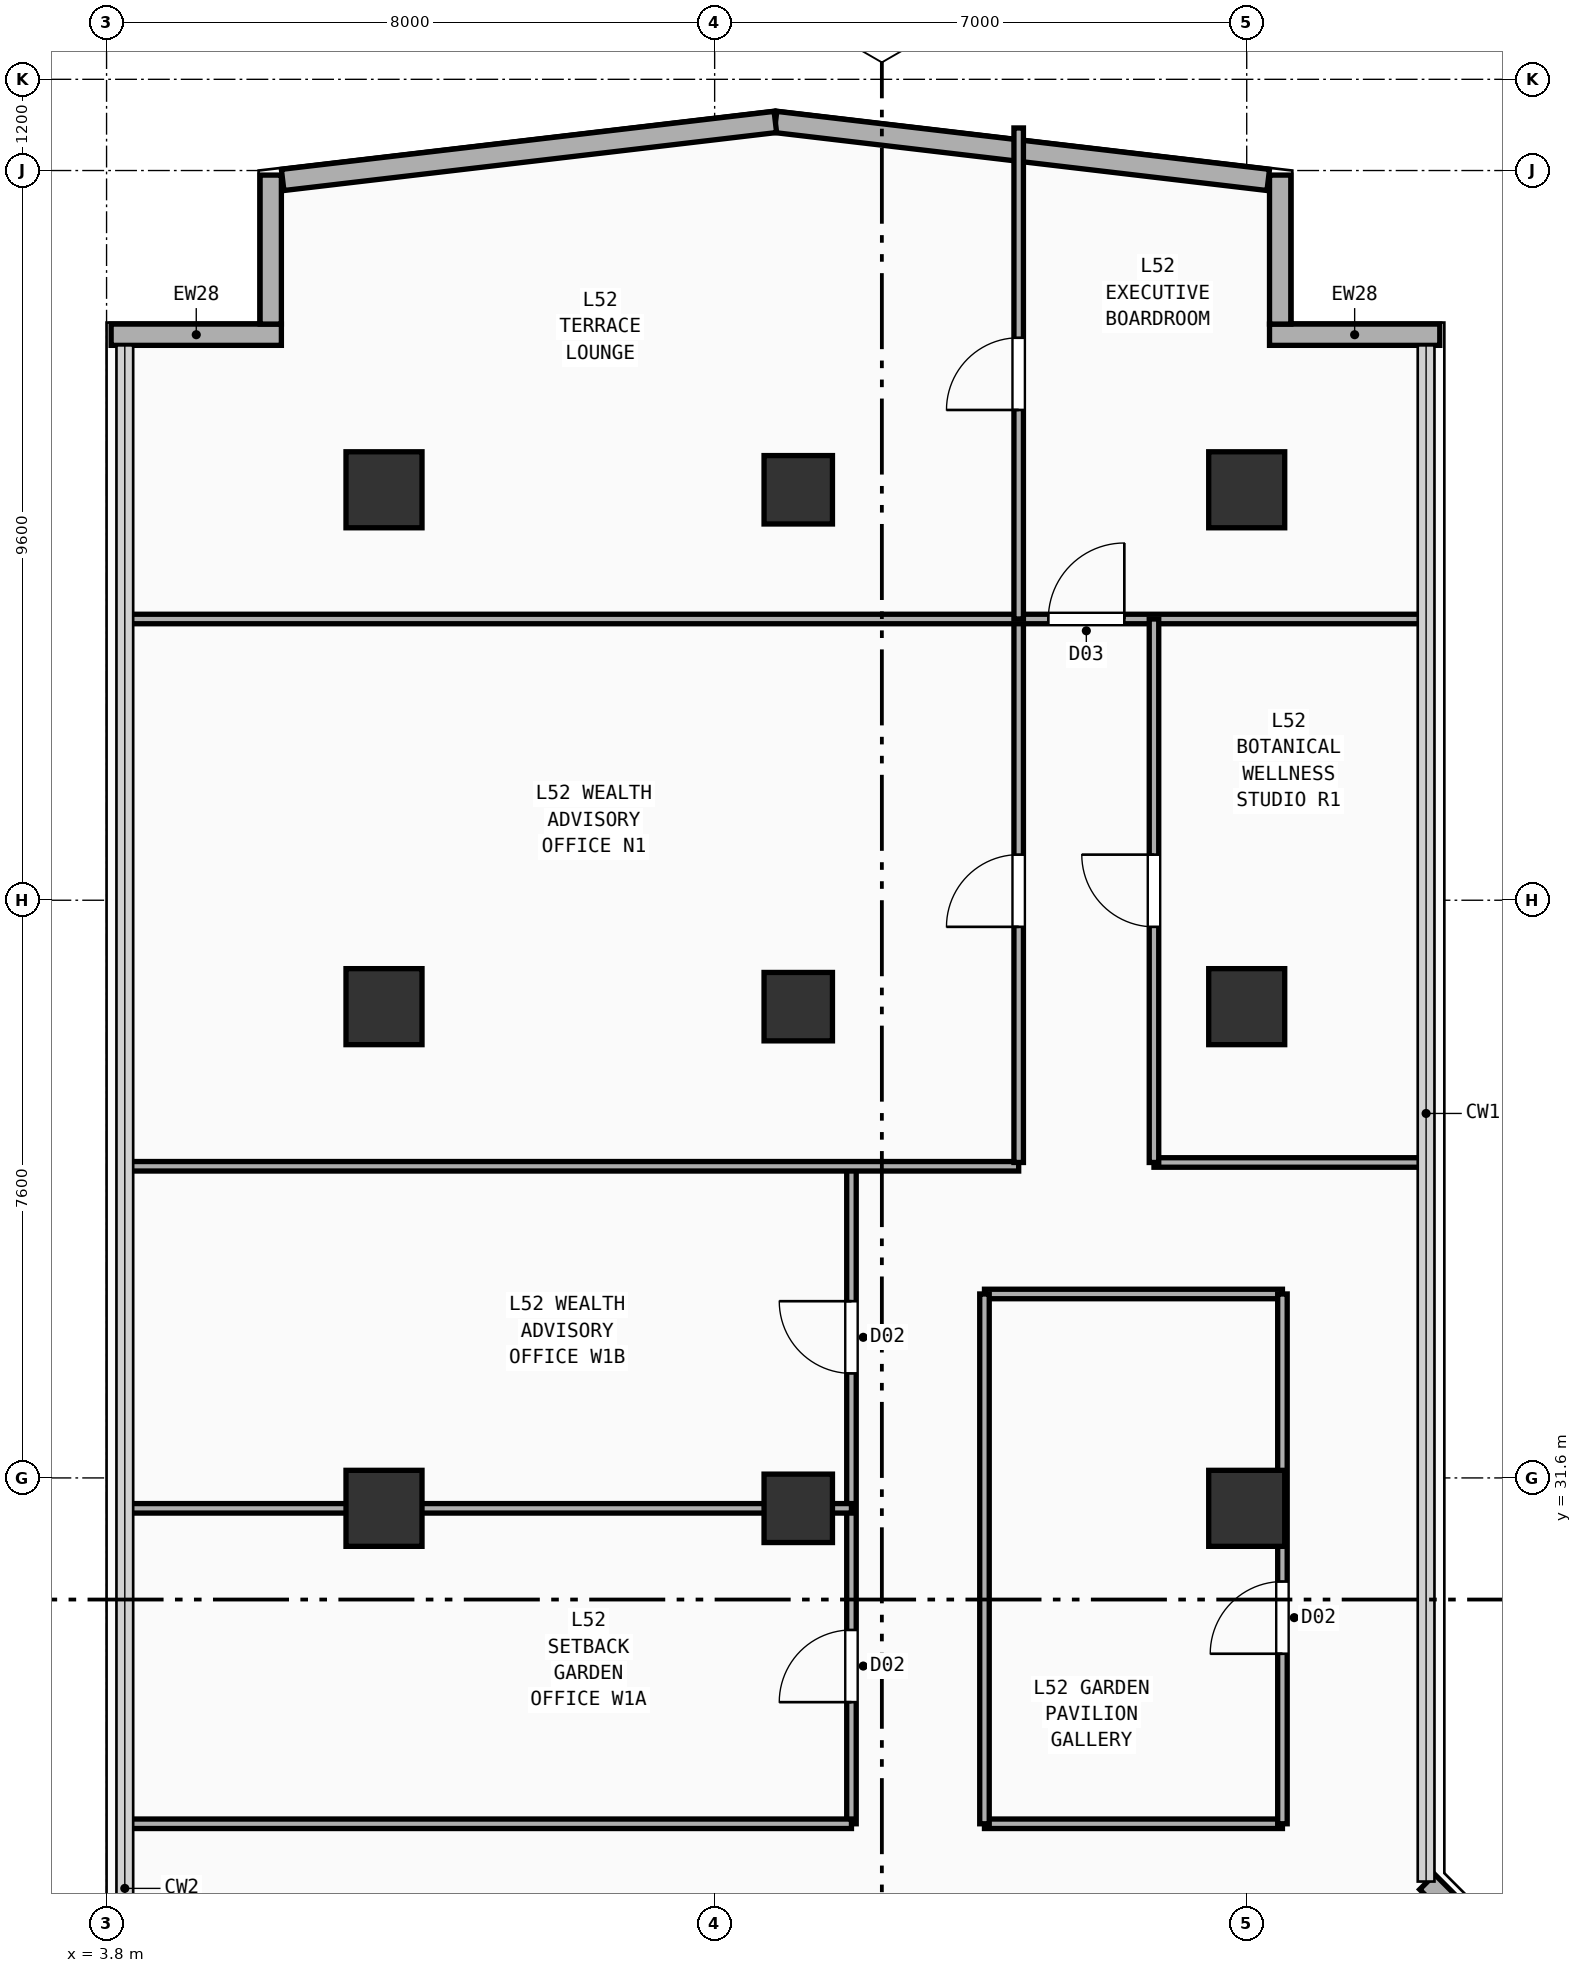
"""IFC4 building model, lengths in metres.
Left out: names, types, materials, properties, quantities, classifications, styles, units other than length and angle.
Written with IfcOpenShell. Run it as: python <this file> out.ifc"""

import sys

from ifc_helpers import new_model, si_unit, direction, frame, frame_2d, origin, origin_2d, place, context, subcontext, project, spatial, rectangle, extrude, element, fill, save


model = new_model("IFC4")
c1 = context("Model", 3, precision=1e-05, world=origin(), true_north=direction((0.0, 1.0)))
c2 = subcontext(c1, "Body", "Model", "MODEL_VIEW")
j1 = project(units=[si_unit("LENGTHUNIT", "METRE"), si_unit("PLANEANGLEUNIT", "RADIAN")], contexts=[c1])
p1 = place(None, origin())
s1 = spatial("IfcSite", under=j1, at=p1, CompositionType="ELEMENT")
p2 = place(p1, origin())
s2 = spatial("IfcBuilding", under=s1, at=p2, CompositionType="ELEMENT")
p3 = place(p2, frame((0.0, 0.0, 204.5)))
s3 = spatial("IfcBuildingStorey", under=s2, at=p3, CompositionType="ELEMENT", Elevation=204.5)
for number, where, z_axis, x_axis in (
    (1, (7.45, 31.2, 0.0), (0.0, 0.0, 1.0), (1.0, 0.0, 0.0)),
    (2, (7.45, 37.8, 0.0), (0.0, 0.0, 1.0), (1.0, 0.0, 0.0)),
    (3, (7.45, 44.6, 0.0), (0.0, 0.0, 1.0), (1.0, 0.0, 0.0)),
    (4, (18.8, 31.2, 0.0), (0.0, 0.0, 1.0), (1.0, 0.0, 0.0)),
    (5, (18.8, 37.8, 0.0), (0.0, 0.0, 1.0), (1.0, 0.0, 0.0)),
    (6, (18.8, 44.6, 0.0), (0.0, 0.0, 1.0), (1.0, 0.0, 0.0)),
):
    element("IfcColumn", number, at=place(p3, frame(where, z_axis=z_axis, x_axis=x_axis)), inside=s3, PredefinedType="COLUMN", context=c2, shape_type="SweptSolid", body=[
        extrude(rectangle(XDim=1.0, YDim=1.0, at=origin_2d()), origin(), (0.0, 0.0, 1.0), 3.56),
    ])
for number, where, z_axis, x_axis in (
    (7, (12.9, 31.2, 0.0), (0.0, 0.0, 1.0), (1.0, 0.0, 0.0)),
    (8, (12.9, 37.8, 0.0), (0.0, 0.0, 1.0), (1.0, 0.0, 0.0)),
    (9, (12.9, 44.6, 0.0), (0.0, 0.0, 1.0), (1.0, 0.0, 0.0)),
):
    element("IfcColumn", number, at=place(p3, frame(where, z_axis=z_axis, x_axis=x_axis)), inside=s3, PredefinedType="COLUMN", context=c2, shape_type="SweptSolid", body=[
        extrude(rectangle(XDim=0.9, YDim=0.9, at=origin_2d()), origin(), (0.0, 0.0, 1.0), 3.56),
    ])
p4 = place(p3, frame((19.1, 46.64, 0.0), z_axis=(0.0, 0.0, 1.0), x_axis=(1.0, 0.0, 0.0)))
e10 = element("IfcWall", 10, at=p4, inside=s3, PredefinedType="SOLIDWALL", context=c2, shape_type="SweptSolid", body=[
    extrude(rectangle(XDim=2.24, YDim=0.28, at=frame_2d((1.12, 0.0))), origin(), (0.0, 0.0, 1.0), 3.56),
])
p5 = place(p3, frame((19.24, 46.78, 0.0), z_axis=(0.0, 0.0, 1.0), x_axis=(0.0, 1.0, 0.0)))
e11 = element("IfcWall", 11, at=p5, inside=s3, PredefinedType="SOLIDWALL", context=c2, shape_type="SweptSolid", body=[
    extrude(rectangle(XDim=1.96, YDim=0.28, at=frame_2d((0.98, 0.0))), origin(), (0.0, 0.0, 1.0), 3.56),
])
p6 = place(p3, frame((3.86, 46.64, 0.0), z_axis=(0.0, 0.0, 1.0), x_axis=(1.0, 0.0, 0.0)))
e12 = element("IfcWall", 12, at=p6, inside=s3, PredefinedType="SOLIDWALL", context=c2, shape_type="SweptSolid", body=[
    extrude(rectangle(XDim=2.24, YDim=0.28, at=frame_2d((1.12, 0.0))), origin(), (0.0, 0.0, 1.0), 3.56),
])
p7 = place(p3, frame((5.96, 46.78, 0.0), z_axis=(0.0, 0.0, 1.0), x_axis=(0.0, 1.0, 0.0)))
e13 = element("IfcWall", 13, at=p7, inside=s3, PredefinedType="SOLIDWALL", context=c2, shape_type="SweptSolid", body=[
    extrude(rectangle(XDim=1.96, YDim=0.28, at=frame_2d((0.98, 0.0))), origin(), (0.0, 0.0, 1.0), 3.56),
])
p8 = place(p3, frame((27.685, 19.775, 0.0), z_axis=(0.0, 0.0, 1.0), x_axis=(-0.707106781187, 0.707106781187, 0.0)))
e14 = element("IfcWall", 14, at=p8, inside=s3, PredefinedType="SOLIDWALL", context=c2, shape_type="SweptSolid", body=[
    extrude(rectangle(XDim=9.207, YDim=0.28, at=frame_2d((4.603, 0.0))), origin(), (0.0, 0.0, 1.0), 3.56),
])
for number, where, z_axis, x_axis in (
    (15, (19.083, 48.676, 0.0), (0.0, 0.0, 1.0), (-0.993, 0.117, 0.0)),
    (16, (12.599, 49.439, 0.0), (0.0, 0.0, 1.0), (-0.993, -0.117, 0.0)),
):
    element("IfcWall", number, at=place(p3, frame(where, z_axis=z_axis, x_axis=x_axis)), inside=s3, PredefinedType="SOLIDWALL", context=c2, shape_type="SweptSolid", body=[
        extrude(rectangle(XDim=6.527, YDim=0.28, at=frame_2d((3.263, 0.0))), origin(), (0.0, 0.0, 1.0), 3.56),
    ])
for number, where, z_axis, x_axis in (
    (17, (15.35, 27.05, 0.0), (0.0, 0.0, 1.0), (1.0, 0.0, 0.0)),
    (18, (15.35, 34.02, 0.0), (0.0, 0.0, 1.0), (1.0, 0.0, 0.0)),
):
    element("IfcWall", number, at=place(p3, frame(where, z_axis=z_axis, x_axis=x_axis)), inside=s3, PredefinedType="PARTITIONING", context=c2, shape_type="SweptSolid", body=[
        extrude(rectangle(XDim=3.92, YDim=0.125, at=frame_2d((1.96, 0.0))), origin(), (0.0, 0.0, 1.0), 3.56),
    ])
p9 = place(p3, frame((15.35, 27.05, 0.0), z_axis=(0.0, 0.0, 1.0), x_axis=(0.0, 1.0, 0.0)))
e19 = element("IfcWall", 19, at=p9, inside=s3, PredefinedType="PARTITIONING", context=c2, shape_type="SweptSolid", body=[
    extrude(rectangle(XDim=6.97, YDim=0.125, at=frame_2d((3.485, 0.0))), origin(), (0.0, 0.0, 1.0), 3.56),
])
p10 = place(p3, frame((19.27, 27.05, 0.0), z_axis=(0.0, 0.0, 1.0), x_axis=(0.0, 1.0, 0.0)))
e20 = element("IfcWall", 20, at=p10, inside=s3, PredefinedType="PARTITIONING", context=c2, shape_type="SweptSolid", body=[
    extrude(rectangle(XDim=6.97, YDim=0.125, at=frame_2d((3.485, 0.0))), origin(), (0.0, 0.0, 1.0), 3.56),
])
p11 = place(p10, frame((2.237, 0.0, 0.0)))
e21 = element("IfcOpeningElement", 21, at=p11, cuts=e20, PredefinedType="OPENING", context=c2, shape_type="SweptSolid", body=[
    extrude(rectangle(XDim=0.95, YDim=2.15, at=frame_2d((0.475, 1.075))), frame((0.0, 0.073, 0.0), z_axis=(0.0, -1.0, 0.0), x_axis=(1.0, 0.0, 0.0)), (0.0, 0.0, 1.0), 0.145),
])
p12 = place(p3, frame((13.6, 27.05, 0.0), z_axis=(0.0, 0.0, 1.0), x_axis=(0.0, 1.0, 0.0)))
e22 = element("IfcWall", 22, at=p12, inside=s3, PredefinedType="PARTITIONING", context=c2, shape_type="SweptSolid", body=[
    extrude(rectangle(XDim=8.65, YDim=0.125, at=frame_2d((4.325, 0.0))), origin(), (0.0, 0.0, 1.0), 3.56),
])
p13 = place(p12, frame((1.6, 0.0, 0.0)))
e23 = element("IfcOpeningElement", 23, at=p13, cuts=e22, PredefinedType="OPENING", context=c2, shape_type="SweptSolid", body=[
    extrude(rectangle(XDim=0.95, YDim=2.15, at=frame_2d((0.475, 1.075))), frame((0.0, 0.073, 0.0), z_axis=(0.0, -1.0, 0.0), x_axis=(1.0, 0.0, 0.0)), (0.0, 0.0, 1.0), 0.145),
])
p14 = place(p12, frame((5.925, 0.0, 0.0)))
e24 = element("IfcOpeningElement", 24, at=p14, cuts=e22, PredefinedType="OPENING", context=c2, shape_type="SweptSolid", body=[
    extrude(rectangle(XDim=0.95, YDim=2.15, at=frame_2d((0.475, 1.075))), frame((0.0, 0.073, 0.0), z_axis=(0.0, -1.0, 0.0), x_axis=(1.0, 0.0, 0.0)), (0.0, 0.0, 1.0), 0.145),
])
p15 = place(p3, frame((4.04, 27.05, 0.0), z_axis=(0.0, 0.0, 1.0), x_axis=(1.0, 0.0, 0.0)))
e25 = element("IfcWall", 25, at=p15, inside=s3, PredefinedType="PARTITIONING", context=c2, shape_type="SweptSolid", body=[
    extrude(rectangle(XDim=9.56, YDim=0.125, at=frame_2d((4.78, 0.0))), origin(), (0.0, 0.0, 1.0), 3.56),
])
p16 = place(p3, frame((4.04, 35.7, 0.0), z_axis=(0.0, 0.0, 1.0), x_axis=(1.0, 0.0, 0.0)))
e26 = element("IfcWall", 26, at=p16, inside=s3, PredefinedType="PARTITIONING", context=c2, shape_type="SweptSolid", body=[
    extrude(rectangle(XDim=11.76, YDim=0.125, at=frame_2d((5.88, 0.0))), origin(), (0.0, 0.0, 1.0), 3.2),
])
p17 = place(p3, frame((4.04, 31.2, 0.0), z_axis=(0.0, 0.0, 1.0), x_axis=(1.0, 0.0, 0.0)))
e27 = element("IfcWall", 27, at=p17, inside=s3, PredefinedType="PARTITIONING", context=c2, shape_type="SweptSolid", body=[
    extrude(rectangle(XDim=9.56, YDim=0.125, at=frame_2d((4.78, 0.0))), origin(), (0.0, 0.0, 1.0), 3.16),
])
p18 = place(p3, frame((15.8, 35.75, 0.0), z_axis=(0.0, 0.0, 1.0), x_axis=(0.0, 1.0, 0.0)))
e28 = element("IfcWall", 28, at=p18, inside=s3, PredefinedType="PARTITIONING", context=c2, shape_type="SweptSolid", body=[
    extrude(rectangle(XDim=7.15, YDim=0.125, at=frame_2d((3.575, 0.0))), origin(), (0.0, 0.0, 1.0), 3.56),
])
p19 = place(p18, frame((3.1, 0.0, 0.0)))
e29 = element("IfcOpeningElement", 29, at=p19, cuts=e28, PredefinedType="OPENING", context=c2, shape_type="SweptSolid", body=[
    extrude(rectangle(XDim=0.95, YDim=2.15, at=frame_2d((0.475, 1.075))), frame((0.0, 0.073, 0.0), z_axis=(0.0, -1.0, 0.0), x_axis=(1.0, 0.0, 0.0)), (0.0, 0.0, 1.0), 0.145),
])
p20 = place(p3, frame((4.04, 42.9, 0.0), z_axis=(0.0, 0.0, 1.0), x_axis=(1.0, 0.0, 0.0)))
e30 = element("IfcWall", 30, at=p20, inside=s3, PredefinedType="PARTITIONING", context=c2, shape_type="SweptSolid", body=[
    extrude(rectangle(XDim=17.12, YDim=0.125, at=frame_2d((8.56, 0.0))), origin(), (0.0, 0.0, 1.0), 3.56),
])
p21 = place(p20, frame((12.15, 0.0, 0.0)))
e31 = element("IfcOpeningElement", 31, at=p21, cuts=e30, PredefinedType="OPENING", context=c2, shape_type="SweptSolid", body=[
    extrude(rectangle(XDim=1.0, YDim=2.2, at=frame_2d((0.5, 1.1))), frame((0.0, 0.073, 0.0), z_axis=(0.0, -1.0, 0.0), x_axis=(1.0, 0.0, 0.0)), (0.0, 0.0, 1.0), 0.145),
])
p22 = place(p3, frame((15.8, 42.9, 0.0), z_axis=(0.0, 0.0, 1.0), x_axis=(0.0, 1.0, 0.0)))
e32 = element("IfcWall", 32, at=p22, inside=s3, PredefinedType="PARTITIONING", context=c2, shape_type="SweptSolid", body=[
    extrude(rectangle(XDim=6.46, YDim=0.125, at=frame_2d((3.23, 0.0))), origin(), (0.0, 0.0, 1.0), 3.56),
])
p23 = place(p22, frame((2.75, 0.0, 0.0)))
e33 = element("IfcOpeningElement", 33, at=p23, cuts=e32, PredefinedType="OPENING", context=c2, shape_type="SweptSolid", body=[
    extrude(rectangle(XDim=0.95, YDim=2.15, at=frame_2d((0.475, 1.075))), frame((0.0, 0.073, 0.0), z_axis=(0.0, -1.0, 0.0), x_axis=(1.0, 0.0, 0.0)), (0.0, 0.0, 1.0), 0.145),
])
p24 = place(p3, frame((17.58, 35.75, 0.0), z_axis=(0.0, 0.0, 1.0), x_axis=(1.0, 0.0, 0.0)))
e34 = element("IfcWall", 34, at=p24, inside=s3, PredefinedType="PARTITIONING", context=c2, shape_type="SweptSolid", body=[
    extrude(rectangle(XDim=3.58, YDim=0.125, at=frame_2d((1.79, 0.0))), origin(), (0.0, 0.0, 1.0), 3.2),
])
p25 = place(p3, frame((17.58, 35.75, 0.0), z_axis=(0.0, 0.0, 1.0), x_axis=(0.0, 1.0, 0.0)))
e35 = element("IfcWall", 35, at=p25, inside=s3, PredefinedType="PARTITIONING", context=c2, shape_type="SweptSolid", body=[
    extrude(rectangle(XDim=7.15, YDim=0.125, at=frame_2d((3.575, 0.0))), origin(), (0.0, 0.0, 1.0), 3.56),
])
p26 = place(p25, frame((3.1, 0.0, 0.0)))
e36 = element("IfcOpeningElement", 36, at=p26, cuts=e35, PredefinedType="OPENING", context=c2, shape_type="SweptSolid", body=[
    extrude(rectangle(XDim=0.95, YDim=2.15, at=frame_2d((0.475, 1.075))), frame((0.0, 0.073, 0.0), z_axis=(0.0, -1.0, 0.0), x_axis=(1.0, 0.0, 0.0)), (0.0, 0.0, 1.0), 0.145),
])
p27 = place(p11, origin())
e37 = element("IfcDoor", 37, at=p27, inside=s3, OperationType="SINGLE_SWING_LEFT", PredefinedType="DOOR", context=c2, shape_type="SweptSolid", body=[
    extrude(rectangle(XDim=0.95, YDim=2.15, at=frame_2d((0.475, 1.075))), frame((0.0, 0.025, 0.0), z_axis=(0.0, -1.0, 0.0), x_axis=(1.0, 0.0, 0.0)), (0.0, 0.0, 1.0), 0.05),
])
fill(e21, e37)
p28 = place(p13, origin())
e38 = element("IfcDoor", 38, at=p28, inside=s3, OperationType="SINGLE_SWING_LEFT", PredefinedType="DOOR", context=c2, shape_type="SweptSolid", body=[
    extrude(rectangle(XDim=0.95, YDim=2.15, at=frame_2d((0.475, 1.075))), frame((0.0, 0.025, 0.0), z_axis=(0.0, -1.0, 0.0), x_axis=(1.0, 0.0, 0.0)), (0.0, 0.0, 1.0), 0.05),
])
fill(e23, e38)
p29 = place(p14, origin())
e39 = element("IfcDoor", 39, at=p29, inside=s3, OperationType="SINGLE_SWING_RIGHT", PredefinedType="DOOR", context=c2, shape_type="SweptSolid", body=[
    extrude(rectangle(XDim=0.95, YDim=2.15, at=frame_2d((0.475, 1.075))), frame((0.0, 0.025, 0.0), z_axis=(0.0, -1.0, 0.0), x_axis=(1.0, 0.0, 0.0)), (0.0, 0.0, 1.0), 0.05),
])
fill(e24, e39)
p30 = place(p19, origin())
e40 = element("IfcDoor", 40, at=p30, inside=s3, OperationType="SINGLE_SWING_LEFT", PredefinedType="DOOR", context=c2, shape_type="SweptSolid", body=[
    extrude(rectangle(XDim=0.95, YDim=2.15, at=frame_2d((0.475, 1.075))), frame((0.0, 0.025, 0.0), z_axis=(0.0, -1.0, 0.0), x_axis=(1.0, 0.0, 0.0)), (0.0, 0.0, 1.0), 0.05),
])
fill(e29, e40)
p31 = place(p21, origin())
e41 = element("IfcDoor", 41, at=p31, inside=s3, OperationType="SINGLE_SWING_RIGHT", PredefinedType="DOOR", context=c2, shape_type="SweptSolid", body=[
    extrude(rectangle(XDim=1.0, YDim=2.2, at=frame_2d((0.5, 1.1))), frame((0.0, 0.025, 0.0), z_axis=(0.0, -1.0, 0.0), x_axis=(1.0, 0.0, 0.0)), (0.0, 0.0, 1.0), 0.05),
])
fill(e31, e41)
p32 = place(p23, origin())
e42 = element("IfcDoor", 42, at=p32, inside=s3, OperationType="SINGLE_SWING_LEFT", PredefinedType="DOOR", context=c2, shape_type="SweptSolid", body=[
    extrude(rectangle(XDim=0.95, YDim=2.15, at=frame_2d((0.475, 1.075))), frame((0.0, 0.025, 0.0), z_axis=(0.0, -1.0, 0.0), x_axis=(1.0, 0.0, 0.0)), (0.0, 0.0, 1.0), 0.05),
])
fill(e33, e42)
p33 = place(p26, origin())
e43 = element("IfcDoor", 43, at=p33, inside=s3, OperationType="SINGLE_SWING_RIGHT", PredefinedType="DOOR", context=c2, shape_type="SweptSolid", body=[
    extrude(rectangle(XDim=0.95, YDim=2.15, at=frame_2d((0.475, 1.075))), frame((0.0, 0.025, 0.0), z_axis=(0.0, -1.0, 0.0), x_axis=(1.0, 0.0, 0.0)), (0.0, 0.0, 1.0), 0.05),
])
fill(e36, e43)
save(model, sys.argv[1])
